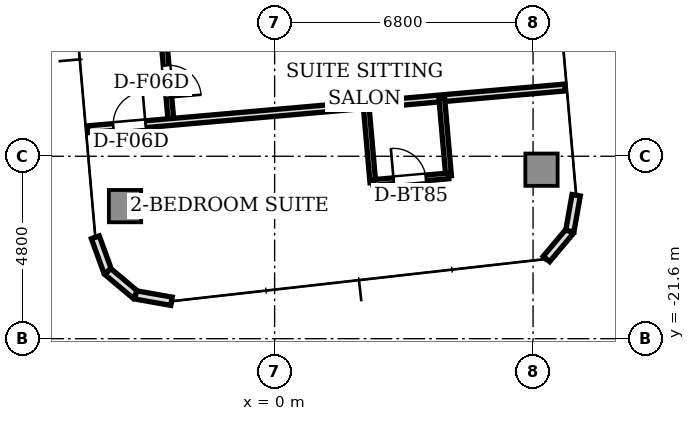
"""IFC4 building model, lengths in metres.
Left out: names, types, materials, properties, quantities, classifications, styles, units other than length and angle.
Written with IfcOpenShell. Run it as: python <this file> out.ifc"""

import sys

from ifc_helpers import new_model, si_unit, direction, frame, frame_2d, origin, origin_2d, place, context, subcontext, project, spatial, rectangle, extrude, source, transform, mapped, element, fill, save


model = new_model("IFC4")
c1 = context("Model", 3, precision=1e-05, world=origin(), true_north=direction((0.0, 1.0)))
c2 = subcontext(c1, "Body", "Model", "MODEL_VIEW")
j1 = project(units=[si_unit("LENGTHUNIT", "METRE"), si_unit("PLANEANGLEUNIT", "RADIAN")], contexts=[c1])
p1 = place(None, origin())
s1 = spatial("IfcSite", under=j1, at=p1, CompositionType="ELEMENT")
p2 = place(p1, origin())
s2 = spatial("IfcBuilding", under=s1, at=p2, CompositionType="ELEMENT")
p3 = place(p2, frame((0.0, 0.0, 170.7)))
s3 = spatial("IfcBuildingStorey", under=s2, at=p3, CompositionType="ELEMENT", Elevation=170.7)
m1 = source(origin(), c2, "Body", "SweptSolid", [
    extrude(rectangle(XDim=0.85, YDim=0.85, at=origin_2d()), origin(), (0.0, 0.0, 1.0), 4.26),
])
for number, where, z_axis, x_axis in (
    (1, (-3.936, -18.112, 0.0), (0.0, 0.0, 1.0), (1.0, 0.0, 0.0)),
    (2, (7.022, -17.153, 0.0), (0.0, 0.0, 1.0), (1.0, 0.0, 0.0)),
):
    element("IfcColumn", number, at=place(p3, frame(where, z_axis=z_axis, x_axis=x_axis)), inside=s3, PredefinedType="COLUMN", context=c2, shape_type="MappedRepresentation", body=[
        mapped(m1, transform((0.0, 0.0, 0.0), scale=1.0)),
    ])
p4 = place(p3, frame((-4.718, -18.933, 0.0), z_axis=(0.0, 0.0, 1.0), x_axis=(0.34188635151, -0.939741306239, 0.0)))
e3 = element("IfcWall", 3, at=p4, inside=s3, PredefinedType="STANDARD", context=c2, shape_type="SweptSolid", body=[
    extrude(rectangle(XDim=0.958, YDim=0.22, at=frame_2d((0.479, 0.0))), origin(), (0.0, 0.0, 1.0), 4.26),
])
for number, where, z_axis, x_axis in (
    (4, (-4.39, -19.833, 0.0), (0.0, 0.0, 1.0), (0.766, -0.643, 0.0)),
    (5, (-3.657, -20.449, 0.0), (0.0, 0.0, 1.0), (0.985, -0.174, 0.0)),
):
    element("IfcWall", number, at=place(p3, frame(where, z_axis=z_axis, x_axis=x_axis)), inside=s3, PredefinedType="STANDARD", context=c2, shape_type="SweptSolid", body=[
        extrude(rectangle(XDim=0.958, YDim=0.22, at=frame_2d((0.479, 0.0))), origin(), (0.0, 0.0, 1.0), 4.26),
    ])
for number, where, z_axis, x_axis in (
    (6, (7.152, -19.503, 0.0), (0.0, 0.0, 1.0), (0.643, 0.766, 0.0)),
    (7, (7.768, -18.769, 0.0), (0.0, 0.0, 1.0), (0.174, 0.985, 0.0)),
):
    element("IfcWall", number, at=place(p3, frame(where, z_axis=z_axis, x_axis=x_axis)), inside=s3, PredefinedType="STANDARD", context=c2, shape_type="SweptSolid", body=[
        extrude(rectangle(XDim=0.958, YDim=0.22, at=frame_2d((0.479, 0.0))), origin(), (0.0, 0.0, 1.0), 4.26),
    ])
p5 = place(p3, frame((-3.095, -11.664, 0.0), z_axis=(0.0, 0.0, 1.0), x_axis=(0.087142722004, -0.996195837173, 0.0)))
e8 = element("IfcWall", 8, at=p5, inside=s3, PredefinedType="PARTITIONING", context=c2, shape_type="SweptSolid", body=[
    extrude(rectangle(XDim=4.25, YDim=0.15, at=frame_2d((2.125, 0.0))), origin(), (0.0, 0.0, 1.0), 3.81),
])
p6 = place(p5, frame((0.63, 0.0, 0.0)))
e9 = element("IfcOpeningElement", 9, at=p6, cuts=e8, PredefinedType="OPENING", context=c2, shape_type="SweptSolid", body=[
    extrude(rectangle(XDim=0.85, YDim=2.1, at=frame_2d((0.425, 1.05))), frame((0.0, 0.085, 0.0), z_axis=(0.0, -1.0, 0.0), x_axis=(1.0, 0.0, 0.0)), (0.0, 0.0, 1.0), 0.17),
])
p7 = place(p5, frame((2.755, 0.0, 0.0)))
e10 = element("IfcOpeningElement", 10, at=p7, cuts=e8, PredefinedType="OPENING", context=c2, shape_type="SweptSolid", body=[
    extrude(rectangle(XDim=0.85, YDim=2.1, at=frame_2d((0.425, 1.05))), frame((0.0, 0.085, 0.0), z_axis=(0.0, -1.0, 0.0), x_axis=(1.0, 0.0, 0.0)), (0.0, 0.0, 1.0), 0.17),
])
p8 = place(p3, frame((-4.917, -16.09, 0.0), z_axis=(0.0, 0.0, 1.0), x_axis=(0.996196619285, 0.087133780622, 0.0)))
e11 = element("IfcWall", 11, at=p8, inside=s3, PredefinedType="PARTITIONING", context=c2, shape_type="SweptSolid", body=[
    extrude(rectangle(XDim=12.6, YDim=0.18, at=frame_2d((6.3, 0.0))), origin(), (0.0, 0.0, 1.0), 3.81),
])
p9 = place(p8, frame((0.675, 0.0, 0.0)))
e12 = element("IfcOpeningElement", 12, at=p9, cuts=e11, PredefinedType="OPENING", context=c2, shape_type="SweptSolid", body=[
    extrude(rectangle(XDim=0.85, YDim=2.1, at=frame_2d((0.425, 1.05))), frame((0.0, 0.1, 0.0), z_axis=(0.0, -1.0, 0.0), x_axis=(1.0, 0.0, 0.0)), (0.0, 0.0, 1.0), 0.2),
])
for number, where, z_axis, x_axis in (
    (13, (4.398, -15.275, 0.0), (0.0, 0.0, 1.0), (0.087, -0.996, 0.0)),
    (14, (2.406, -15.449, 0.0), (0.0, 0.0, 1.0), (0.087, -0.996, 0.0)),
):
    element("IfcWall", number, at=place(p3, frame(where, z_axis=z_axis, x_axis=x_axis)), inside=s3, PredefinedType="PARTITIONING", context=c2, shape_type="SweptSolid", body=[
        extrude(rectangle(XDim=2.05, YDim=0.15, at=frame_2d((1.025, 0.0))), origin(), (0.0, 0.0, 1.0), 3.81),
    ])
p10 = place(p3, frame((2.584, -17.491, 0.0), z_axis=(0.0, 0.0, 1.0), x_axis=(0.99619464492, 0.087156350505, 0.0)))
e15 = element("IfcWall", 15, at=p10, inside=s3, PredefinedType="PARTITIONING", context=c2, shape_type="SweptSolid", body=[
    extrude(rectangle(XDim=2.0, YDim=0.15, at=frame_2d((1.0, 0.0))), origin(), (0.0, 0.0, 1.0), 3.78),
])
p11 = place(p10, frame((0.55, 0.0, 0.0)))
e16 = element("IfcOpeningElement", 16, at=p11, cuts=e15, PredefinedType="OPENING", context=c2, shape_type="SweptSolid", body=[
    extrude(rectangle(XDim=0.85, YDim=2.1, at=frame_2d((0.425, 1.05))), frame((0.0, 0.085, 0.0), z_axis=(0.0, -1.0, 0.0), x_axis=(1.0, 0.0, 0.0)), (0.0, 0.0, 1.0), 0.17),
])
m2 = source(origin(), c2, "Body", "SweptSolid", [
    extrude(rectangle(XDim=0.85, YDim=0.05, at=origin_2d()), origin(), (0.0, 0.0, 1.0), 2.1),
])
p12 = place(p7, frame((0.425, 0.0, 0.0)))
e17 = element("IfcDoor", 17, at=p12, inside=s3, OperationType="SINGLE_SWING_RIGHT", PredefinedType="DOOR", context=c2, shape_type="MappedRepresentation", body=[
    mapped(m2, transform((0.0, 0.0, 0.0), scale=1.0)),
])
fill(e10, e17)
p13 = place(p11, frame((0.425, 0.0, 0.0)))
e18 = element("IfcDoor", 18, at=p13, inside=s3, OperationType="SINGLE_SWING_LEFT", PredefinedType="DOOR", context=c2, shape_type="MappedRepresentation", body=[
    mapped(m2, transform((0.0, 0.0, 0.0), scale=1.0)),
])
fill(e16, e18)
p14 = place(p9, frame((0.425, 0.0, 0.0)))
e19 = element("IfcDoor", 19, at=p14, inside=s3, OperationType="SINGLE_SWING_RIGHT", PredefinedType="DOOR", context=c2, shape_type="MappedRepresentation", body=[
    mapped(m2, transform((0.0, 0.0, 0.0), scale=1.0)),
])
fill(e12, e19)
save(model, sys.argv[1])
